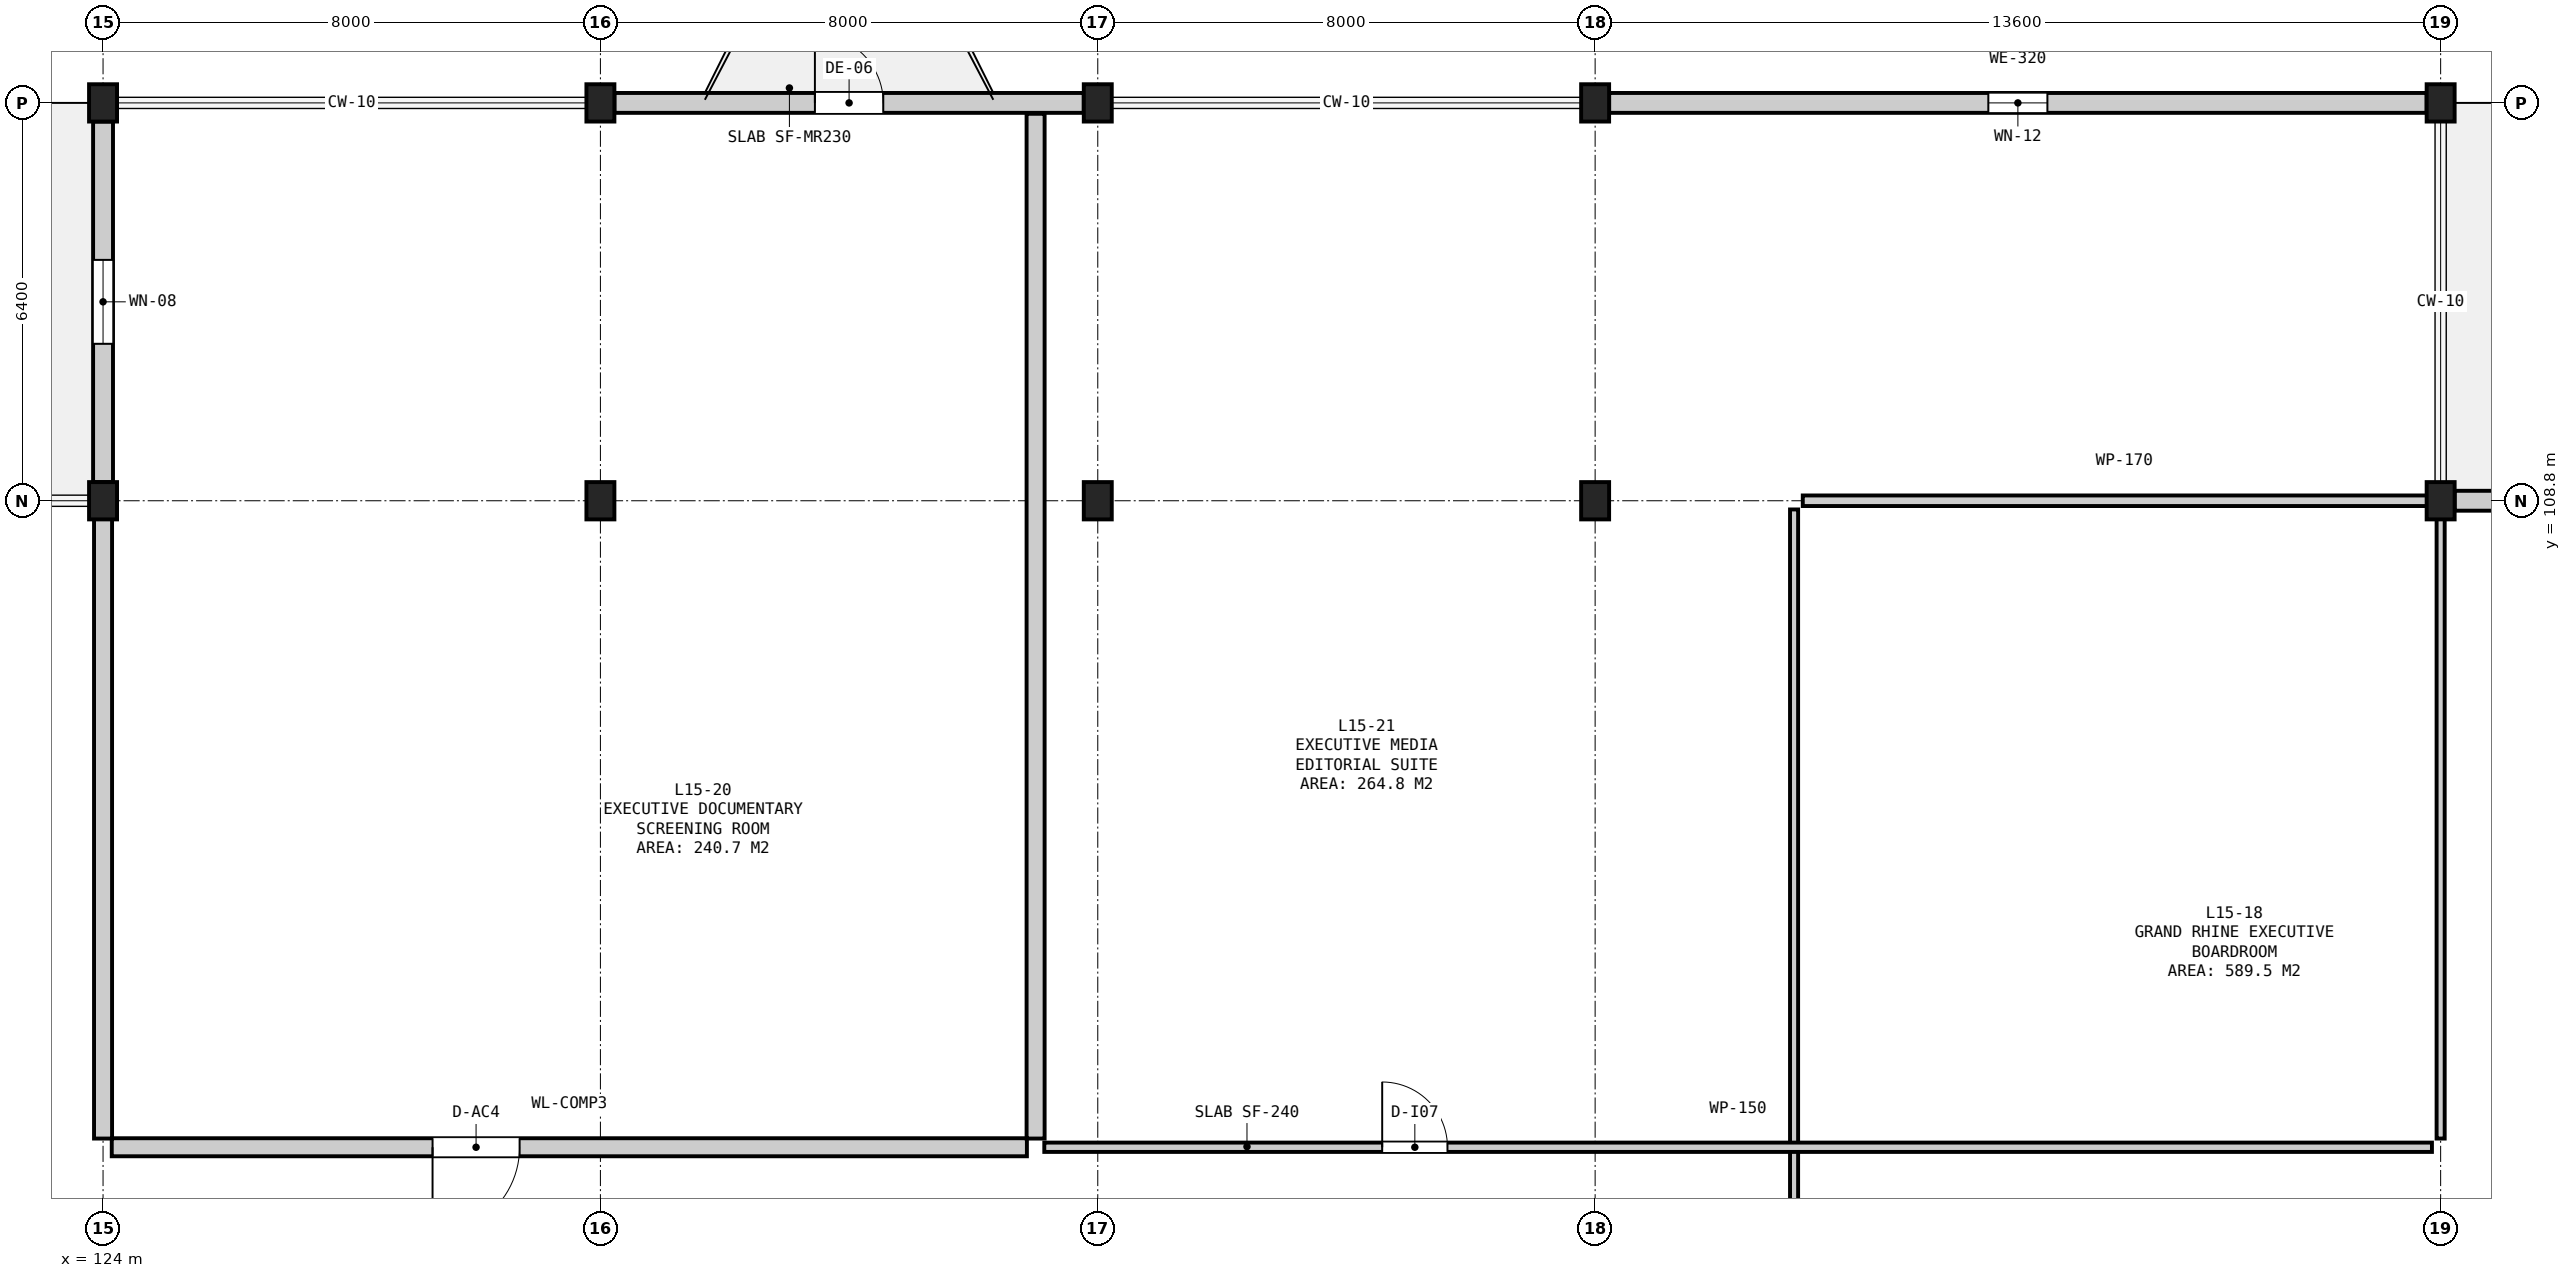
"""IFC4 building model, lengths in metres.
Left out: names, types, materials, properties, quantities, classifications, styles, units other than length and angle.
Written with IfcOpenShell. Run it as: python <this file> out.ifc"""

import sys

from ifc_helpers import new_model, si_unit, direction, frame, frame_2d, origin, origin_2d, place, context, subcontext, project, spatial, rectangle, extrude, element, fill, save


model = new_model("IFC4")
c1 = context("Model", 3, precision=1e-05, world=origin(), true_north=direction((0.0, 1.0)))
c2 = subcontext(c1, "Body", "Model", "MODEL_VIEW")
j1 = project(units=[si_unit("LENGTHUNIT", "METRE"), si_unit("PLANEANGLEUNIT", "RADIAN")], contexts=[c1])
p1 = place(None, origin())
s1 = spatial("IfcSite", under=j1, at=p1, CompositionType="ELEMENT")
p2 = place(p1, origin())
s2 = spatial("IfcBuilding", under=s1, at=p2, CompositionType="ELEMENT")
p3 = place(p2, frame((0.0, 0.0, 62.65)))
s3 = spatial("IfcBuildingStorey", under=s2, at=p3, CompositionType="ELEMENT", Elevation=62.65)
for number, where, z_axis, x_axis in (
    (1, (124.0, 108.8, 0.0), (0.0, 0.0, 1.0), (1.0, 0.0, 0.0)),
    (2, (124.0, 115.2, 0.0), (0.0, 0.0, 1.0), (1.0, 0.0, 0.0)),
    (3, (132.0, 108.8, 0.0), (0.0, 0.0, 1.0), (1.0, 0.0, 0.0)),
    (4, (132.0, 115.2, 0.0), (0.0, 0.0, 1.0), (1.0, 0.0, 0.0)),
    (5, (140.0, 108.8, 0.0), (0.0, 0.0, 1.0), (1.0, 0.0, 0.0)),
    (6, (140.0, 115.2, 0.0), (0.0, 0.0, 1.0), (1.0, 0.0, 0.0)),
    (7, (148.0, 108.8, 0.0), (0.0, 0.0, 1.0), (1.0, 0.0, 0.0)),
    (8, (148.0, 115.2, 0.0), (0.0, 0.0, 1.0), (1.0, 0.0, 0.0)),
    (9, (161.6, 108.8, 0.0), (0.0, 0.0, 1.0), (1.0, 0.0, 0.0)),
    (10, (161.6, 115.2, 0.0), (0.0, 0.0, 1.0), (1.0, 0.0, 0.0)),
):
    element("IfcColumn", number, at=place(p3, frame(where, z_axis=z_axis, x_axis=x_axis)), inside=s3, PredefinedType="COLUMN", context=c2, shape_type="SweptSolid", body=[
        extrude(rectangle(XDim=0.45, YDim=0.6, at=origin_2d()), origin(), (0.0, 0.0, 1.0), 3.95),
    ])
p4 = place(p3, frame((164.55, 108.8, 0.0), z_axis=(0.0, 0.0, 1.0), x_axis=(-1.0, 0.0, 0.0)))
e11 = element("IfcWall", 11, at=p4, inside=s3, PredefinedType="SOLIDWALL", context=c2, shape_type="SweptSolid", body=[
    extrude(rectangle(XDim=2.725, YDim=0.32, at=frame_2d((1.363, 0.0))), origin(), (0.0, 0.0, 1.0), 3.05),
])
p5 = place(p4, frame((0.762, 0.0, 0.9)))
e12 = element("IfcOpeningElement", 12, at=p5, cuts=e11, PredefinedType="OPENING", context=c2, shape_type="SweptSolid", body=[
    extrude(rectangle(XDim=1.2, YDim=1.7, at=frame_2d((0.6, 0.85))), frame((0.0, 0.172, 0.0), z_axis=(0.0, -1.0, 0.0), x_axis=(1.0, 0.0, 0.0)), (0.0, 0.0, 1.0), 0.344),
])
p6 = place(p3, frame((161.375, 115.2, 0.0), z_axis=(0.0, 0.0, 1.0), x_axis=(-1.0, 0.0, 0.0)))
e13 = element("IfcWall", 13, at=p6, inside=s3, PredefinedType="SOLIDWALL", context=c2, shape_type="SweptSolid", body=[
    extrude(rectangle(XDim=13.15, YDim=0.32, at=frame_2d((6.575, 0.0))), origin(), (0.0, 0.0, 1.0), 2.585),
])
p7 = place(p6, frame((6.1, 0.0, 0.8)))
e14 = element("IfcOpeningElement", 14, at=p7, cuts=e13, PredefinedType="OPENING", context=c2, shape_type="SweptSolid", body=[
    extrude(rectangle(XDim=0.95, YDim=1.45, at=frame_2d((0.475, 0.725))), frame((0.0, 0.172, 0.0), z_axis=(0.0, -1.0, 0.0), x_axis=(1.0, 0.0, 0.0)), (0.0, 0.0, 1.0), 0.344),
])
p8 = place(p3, frame((139.775, 115.2, 0.0), z_axis=(0.0, 0.0, 1.0), x_axis=(-1.0, 0.0, 0.0)))
e15 = element("IfcWall", 15, at=p8, inside=s3, PredefinedType="SOLIDWALL", context=c2, shape_type="SweptSolid", body=[
    extrude(rectangle(XDim=7.55, YDim=0.32, at=frame_2d((3.775, 0.0))), origin(), (0.0, 0.0, 1.0), 3.05),
])
p9 = place(p8, frame((3.225, 0.0, 0.0)))
e16 = element("IfcOpeningElement", 16, at=p9, cuts=e15, PredefinedType="OPENING", context=c2, shape_type="SweptSolid", body=[
    extrude(rectangle(XDim=1.1, YDim=2.2, at=frame_2d((0.55, 1.1))), frame((0.0, 0.172, 0.0), z_axis=(0.0, -1.0, 0.0), x_axis=(1.0, 0.0, 0.0)), (0.0, 0.0, 1.0), 0.344),
])
p10 = place(p3, frame((124.0, 114.9, 0.0), z_axis=(0.0, 0.0, 1.0), x_axis=(0.0, -1.0, 0.0)))
e17 = element("IfcWall", 17, at=p10, inside=s3, PredefinedType="SOLIDWALL", context=c2, shape_type="SweptSolid", body=[
    extrude(rectangle(XDim=5.8, YDim=0.32, at=frame_2d((2.9, 0.0))), origin(), (0.0, 0.0, 1.0), 3.05),
])
p11 = place(p10, frame((2.225, 0.0, 0.9)))
e18 = element("IfcOpeningElement", 18, at=p11, cuts=e17, PredefinedType="OPENING", context=c2, shape_type="SweptSolid", body=[
    extrude(rectangle(XDim=1.35, YDim=1.75, at=frame_2d((0.675, 0.875))), frame((0.0, 0.172, 0.0), z_axis=(0.0, -1.0, 0.0), x_axis=(1.0, 0.0, 0.0)), (0.0, 0.0, 1.0), 0.344),
])
p12 = place(p3, frame((151.34, 108.8, 0.0), z_axis=(0.0, 0.0, 1.0), x_axis=(1.0, 0.0, 0.0)))
e19 = element("IfcWall", 19, at=p12, inside=s3, PredefinedType="PARTITIONING", context=c2, shape_type="SweptSolid", body=[
    extrude(rectangle(XDim=10.345, YDim=0.17, at=frame_2d((5.172, 0.0))), origin(), (0.0, 0.0, 1.0), 2.595),
])
p13 = place(p3, frame((151.2, 76.0, 0.0), z_axis=(0.0, 0.0, 1.0), x_axis=(0.0, 1.0, 0.0)))
e20 = element("IfcWall", 20, at=p13, inside=s3, PredefinedType="PARTITIONING", context=c2, shape_type="SweptSolid", body=[
    extrude(rectangle(XDim=32.66, YDim=0.13, at=frame_2d((16.33, 0.0))), origin(), (0.0, 0.0, 1.0), 3.67),
])
p14 = place(p13, frame((6.675, 0.0, 0.0)))
e21 = element("IfcOpeningElement", 21, at=p14, cuts=e20, PredefinedType="OPENING", context=c2, shape_type="SweptSolid", body=[
    extrude(rectangle(XDim=1.05, YDim=2.15, at=frame_2d((0.525, 1.075))), frame((0.0, 0.077, 0.0), z_axis=(0.0, -1.0, 0.0), x_axis=(1.0, 0.0, 0.0)), (0.0, 0.0, 1.0), 0.154),
])
p15 = place(p3, frame((124.14, 98.4, 0.0), z_axis=(0.0, 0.0, 1.0), x_axis=(1.0, 0.0, 0.0)))
e22 = element("IfcWall", 22, at=p15, inside=s3, PredefinedType="SOLIDWALL", context=c2, shape_type="SweptSolid", body=[
    extrude(rectangle(XDim=14.72, YDim=0.29, at=frame_2d((7.36, 0.0))), origin(), (0.0, 0.0, 1.0), 3.67),
])
p16 = place(p15, frame((5.16, 0.0, 0.0)))
e23 = element("IfcOpeningElement", 23, at=p16, cuts=e22, PredefinedType="OPENING", context=c2, shape_type="SweptSolid", body=[
    extrude(rectangle(XDim=1.4, YDim=2.2, at=frame_2d((0.7, 1.1))), frame((0.0, 0.157, 0.0), z_axis=(0.0, -1.0, 0.0), x_axis=(1.0, 0.0, 0.0)), (0.0, 0.0, 1.0), 0.314),
])
p17 = place(p3, frame((124.0, 98.54, 0.0), z_axis=(0.0, 0.0, 1.0), x_axis=(0.0, 1.0, 0.0)))
e24 = element("IfcWall", 24, at=p17, inside=s3, PredefinedType="SOLIDWALL", context=c2, shape_type="SweptSolid", body=[
    extrude(rectangle(XDim=10.42, YDim=0.29, at=frame_2d((5.21, 0.0))), origin(), (0.0, 0.0, 1.0), 2.595),
])
p18 = place(p3, frame((139.0, 98.54, 0.0), z_axis=(0.0, 0.0, 1.0), x_axis=(0.0, 1.0, 0.0)))
e25 = element("IfcWall", 25, at=p18, inside=s3, PredefinedType="SOLIDWALL", context=c2, shape_type="SweptSolid", body=[
    extrude(rectangle(XDim=16.485, YDim=0.29, at=frame_2d((8.242, 0.0))), origin(), (0.0, 0.0, 1.0), 3.67),
])
p19 = place(p3, frame((139.14, 98.4, 0.0), z_axis=(0.0, 0.0, 1.0), x_axis=(1.0, 0.0, 0.0)))
e26 = element("IfcWall", 26, at=p19, inside=s3, PredefinedType="PARTITIONING", context=c2, shape_type="SweptSolid", body=[
    extrude(rectangle(XDim=22.32, YDim=0.15, at=frame_2d((11.16, 0.0))), origin(), (0.0, 0.0, 1.0), 3.67),
])
p20 = place(p19, frame((5.435, 0.0, 0.0)))
e27 = element("IfcOpeningElement", 27, at=p20, cuts=e26, PredefinedType="OPENING", context=c2, shape_type="SweptSolid", body=[
    extrude(rectangle(XDim=1.05, YDim=2.15, at=frame_2d((0.525, 1.075))), frame((0.0, 0.087, 0.0), z_axis=(0.0, -1.0, 0.0), x_axis=(1.0, 0.0, 0.0)), (0.0, 0.0, 1.0), 0.174),
])
p21 = place(p3, frame((161.6, 98.54, 0.0), z_axis=(0.0, 0.0, 1.0), x_axis=(0.0, 1.0, 0.0)))
e28 = element("IfcWall", 28, at=p21, inside=s3, PredefinedType="PARTITIONING", context=c2, shape_type="SweptSolid", body=[
    extrude(rectangle(XDim=10.42, YDim=0.13, at=frame_2d((5.21, 0.0))), origin(), (0.0, 0.0, 1.0), 2.595),
])
p22 = place(p7, origin())
e29 = element("IfcWindow", 29, at=p22, inside=s3, PartitioningType="SINGLE_PANEL", PredefinedType="WINDOW", context=c2, shape_type="SweptSolid", body=[
    extrude(rectangle(XDim=0.95, YDim=1.45, at=frame_2d((0.475, 0.725))), frame((0.0, 0.03, 0.0), z_axis=(0.0, -1.0, 0.0), x_axis=(1.0, 0.0, 0.0)), (0.0, 0.0, 1.0), 0.06),
])
fill(e14, e29)
p23 = place(p9, frame((1.1, 0.0, 0.0), z_axis=(0.0, 0.0, 1.0), x_axis=(-1.0, 0.0, 0.0)))
e30 = element("IfcDoor", 30, at=p23, inside=s3, OperationType="SINGLE_SWING_LEFT", PredefinedType="DOOR", context=c2, shape_type="SweptSolid", body=[
    extrude(rectangle(XDim=1.1, YDim=2.2, at=frame_2d((0.55, 1.1))), frame((0.0, 0.025, 0.0), z_axis=(0.0, -1.0, 0.0), x_axis=(1.0, 0.0, 0.0)), (0.0, 0.0, 1.0), 0.05),
])
fill(e16, e30)
p24 = place(p11, origin())
e31 = element("IfcWindow", 31, at=p24, inside=s3, PartitioningType="SINGLE_PANEL", PredefinedType="WINDOW", context=c2, shape_type="SweptSolid", body=[
    extrude(rectangle(XDim=1.35, YDim=1.75, at=frame_2d((0.675, 0.875))), frame((0.0, 0.03, 0.0), z_axis=(0.0, -1.0, 0.0), x_axis=(1.0, 0.0, 0.0)), (0.0, 0.0, 1.0), 0.06),
])
fill(e18, e31)
p25 = place(p16, frame((1.4, 0.0, 0.0), z_axis=(0.0, 0.0, 1.0), x_axis=(-1.0, 0.0, 0.0)))
e32 = element("IfcDoor", 32, at=p25, inside=s3, OperationType="SINGLE_SWING_RIGHT", PredefinedType="DOOR", context=c2, shape_type="SweptSolid", body=[
    extrude(rectangle(XDim=1.4, YDim=2.2, at=frame_2d((0.7, 1.1))), frame((0.0, 0.025, 0.0), z_axis=(0.0, -1.0, 0.0), x_axis=(1.0, 0.0, 0.0)), (0.0, 0.0, 1.0), 0.05),
])
fill(e23, e32)
p26 = place(p20, origin())
e33 = element("IfcDoor", 33, at=p26, inside=s3, OperationType="SINGLE_SWING_LEFT", PredefinedType="DOOR", context=c2, shape_type="SweptSolid", body=[
    extrude(rectangle(XDim=1.05, YDim=2.15, at=frame_2d((0.525, 1.075))), frame((0.0, 0.025, 0.0), z_axis=(0.0, -1.0, 0.0), x_axis=(1.0, 0.0, 0.0)), (0.0, 0.0, 1.0), 0.05),
])
fill(e27, e33)
save(model, sys.argv[1])
